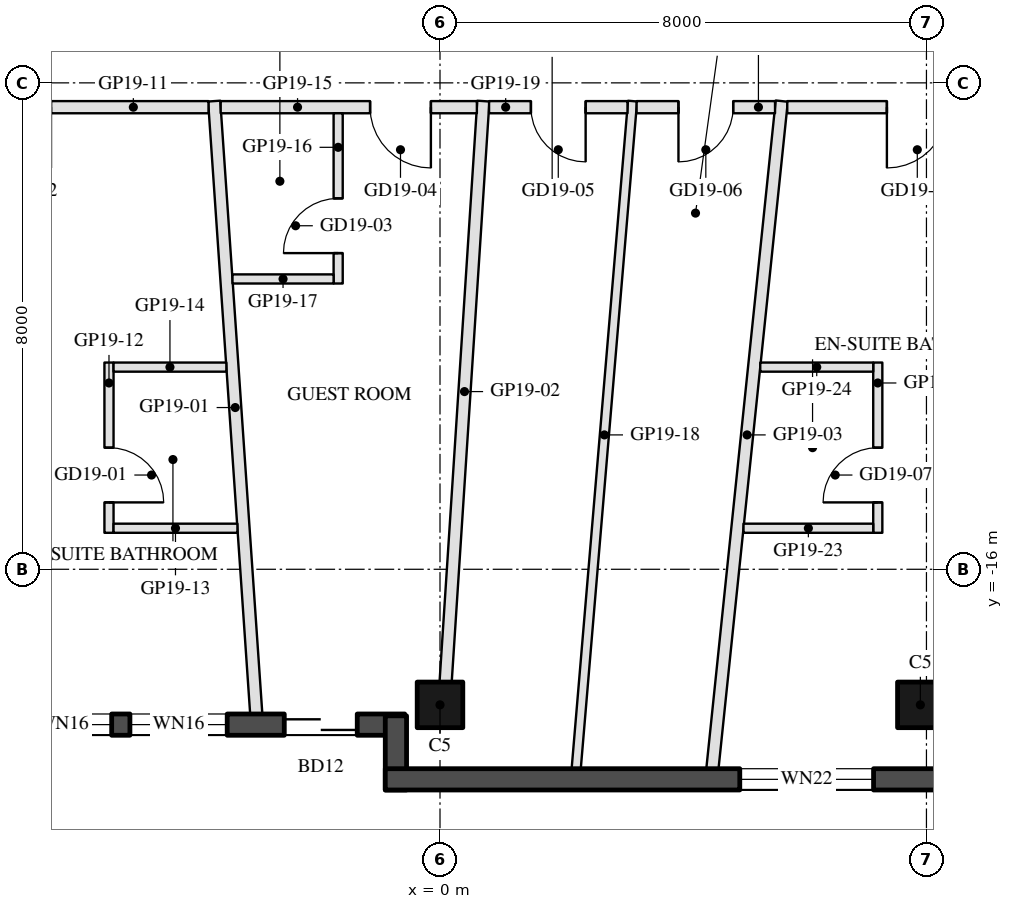
"""IFC4 building model, lengths in metres.
Left out: names, types, materials, properties, quantities, classifications, styles, units other than length and angle.
Written with IfcOpenShell. Run it as: python <this file> out.ifc"""

import sys

from ifc_helpers import new_model, si_unit, direction, frame, frame_2d, origin, origin_2d, place, context, subcontext, project, spatial, rectangle, hollow_rectangle, extrude, element, fill, save


model = new_model("IFC4")
c1 = context("Model", 3, precision=1e-05, world=origin(), true_north=direction((0.0, 1.0)))
c2 = subcontext(c1, "Body", "Model", "MODEL_VIEW")
j1 = project(units=[si_unit("LENGTHUNIT", "METRE"), si_unit("PLANEANGLEUNIT", "RADIAN")], contexts=[c1])
p1 = place(None, origin())
s1 = spatial("IfcSite", under=j1, at=p1, CompositionType="ELEMENT")
p2 = place(p1, origin())
s2 = spatial("IfcBuilding", under=s1, at=p2, CompositionType="ELEMENT")
p3 = place(p2, frame((0.0, 0.0, 205.8)))
s3 = spatial("IfcBuildingStorey", under=s2, at=p3, CompositionType="ELEMENT", Elevation=205.8)
for number, where, z_axis, x_axis in (
    (1, (0.0, -18.23, 0.0), (0.0, 0.0, 1.0), (-1.0, 0.0, 0.0)),
    (2, (7.9, -18.23, 0.0), (0.0, 0.0, 1.0), (-1.0, 0.0, 0.0)),
):
    element("IfcColumn", number, at=place(p3, frame(where, z_axis=z_axis, x_axis=x_axis)), inside=s3, PredefinedType="COLUMN", context=c2, shape_type="SweptSolid", body=[
        extrude(hollow_rectangle(XDim=0.75, YDim=0.75, WallThickness=0.035, at=origin_2d()), origin(), (0.0, 0.0, 1.0), 3.7),
    ])
p4 = place(p3, frame((-7.32, -18.555, 0.0), z_axis=(0.0, 0.0, 1.0), x_axis=(1.0, 0.0, 0.0)))
e3 = element("IfcWall", 3, at=p4, inside=s3, PredefinedType="SOLIDWALL", context=c2, shape_type="SweptSolid", body=[
    extrude(rectangle(XDim=6.74, YDim=0.35, at=frame_2d((3.37, 0.0))), origin(), (0.0, 0.0, 1.0), 3.55),
])
p5 = place(p4, frame((0.32, 0.0, 0.3)))
e4 = element("IfcOpeningElement", 4, at=p5, cuts=e3, PredefinedType="OPENING", context=c2, shape_type="SweptSolid", body=[
    extrude(rectangle(XDim=1.6, YDim=2.65, at=frame_2d((0.8, 1.325))), frame((0.0, 0.185, 0.0), z_axis=(0.0, -1.0, 0.0), x_axis=(1.0, 0.0, 0.0)), (0.0, 0.0, 1.0), 0.37),
])
p6 = place(p4, frame((2.22, 0.0, 0.3)))
e5 = element("IfcOpeningElement", 5, at=p6, cuts=e3, PredefinedType="OPENING", context=c2, shape_type="SweptSolid", body=[
    extrude(rectangle(XDim=1.6, YDim=2.65, at=frame_2d((0.8, 1.325))), frame((0.0, 0.185, 0.0), z_axis=(0.0, -1.0, 0.0), x_axis=(1.0, 0.0, 0.0)), (0.0, 0.0, 1.0), 0.37),
])
p7 = place(p4, frame((4.759, 0.0, 0.0)))
e6 = element("IfcOpeningElement", 6, at=p7, cuts=e3, PredefinedType="OPENING", context=c2, shape_type="SweptSolid", body=[
    extrude(rectangle(XDim=1.2, YDim=2.4, at=frame_2d((0.6, 1.2))), frame((0.0, 0.185, 0.0), z_axis=(0.0, -1.0, 0.0), x_axis=(1.0, 0.0, 0.0)), (0.0, 0.0, 1.0), 0.37),
])
p8 = place(p3, frame((-0.725, -18.41, 0.0), z_axis=(0.0, 0.0, 1.0), x_axis=(0.0, -1.0, 0.0)))
e7 = element("IfcWall", 7, at=p8, inside=s3, PredefinedType="SOLIDWALL", context=c2, shape_type="SweptSolid", body=[
    extrude(rectangle(XDim=1.22, YDim=0.35, at=frame_2d((0.61, 0.0))), origin(), (0.0, 0.0, 1.0), 3.55),
])
p9 = place(p3, frame((-0.9, -19.455, 0.0), z_axis=(0.0, 0.0, 1.0), x_axis=(1.0, 0.0, 0.0)))
e8 = element("IfcWall", 8, at=p9, inside=s3, PredefinedType="SOLIDWALL", context=c2, shape_type="SweptSolid", body=[
    extrude(rectangle(XDim=9.7, YDim=0.35, at=frame_2d((4.85, 0.0))), origin(), (0.0, 0.0, 1.0), 3.55),
])
p10 = place(p9, frame((5.83, 0.0, 0.3)))
e9 = element("IfcOpeningElement", 9, at=p10, cuts=e8, PredefinedType="OPENING", context=c2, shape_type="SweptSolid", body=[
    extrude(rectangle(XDim=2.2, YDim=2.65, at=frame_2d((1.1, 1.325))), frame((0.0, 0.185, 0.0), z_axis=(0.0, -1.0, 0.0), x_axis=(1.0, 0.0, 0.0)), (0.0, 0.0, 1.0), 0.37),
])
p11 = place(p3, frame((-3.022, -18.38, 0.0), z_axis=(0.0, 0.0, 1.0), x_axis=(-0.068480322914, 0.997652467232, 0.0)))
e10 = element("IfcWall", 10, at=p11, inside=s3, PredefinedType="PARTITIONING", context=c2, shape_type="SweptSolid", body=[
    extrude(rectangle(XDim=10.104, YDim=0.2, at=frame_2d((5.052, 0.0))), origin(), (0.0, 0.0, 1.0), 3.06),
])
p12 = place(p3, frame((0.093, -17.855, 0.0), z_axis=(0.0, 0.0, 1.0), x_axis=(0.064789362054, 0.997898962102, 0.0)))
e11 = element("IfcWall", 11, at=p12, inside=s3, PredefinedType="PARTITIONING", context=c2, shape_type="SweptSolid", body=[
    extrude(rectangle(XDim=9.575, YDim=0.2, at=frame_2d((4.788, 0.0))), origin(), (0.0, 0.0, 1.0), 2.95),
])
p13 = place(p3, frame((4.48, -19.28, 0.0), z_axis=(0.0, 0.0, 1.0), x_axis=(0.103348095524, 0.994645248896, 0.0)))
e12 = element("IfcWall", 12, at=p13, inside=s3, PredefinedType="PARTITIONING", context=c2, shape_type="SweptSolid", body=[
    extrude(rectangle(XDim=11.039, YDim=0.2, at=frame_2d((5.52, 0.0))), origin(), (0.0, 0.0, 1.0), 3.06),
])
p14 = place(p3, frame((-3.807, -8.4, 0.0), z_axis=(0.0, 0.0, 1.0), x_axis=(-1.0, 0.0, 0.0)))
e13 = element("IfcWall", 13, at=p14, inside=s3, PredefinedType="PARTITIONING", context=c2, shape_type="SweptSolid", body=[
    extrude(rectangle(XDim=6.181, YDim=0.2, at=frame_2d((3.091, 0.0))), origin(), (0.0, 0.0, 1.0), 2.95),
])
p15 = place(p14, frame((2.591, 0.0, 0.0)))
e14 = element("IfcOpeningElement", 14, at=p15, cuts=e13, PredefinedType="OPENING", context=c2, shape_type="SweptSolid", body=[
    extrude(rectangle(XDim=1.0, YDim=2.1, at=frame_2d((0.5, 1.05))), frame((0.0, 0.11, 0.0), z_axis=(0.0, -1.0, 0.0), x_axis=(1.0, 0.0, 0.0)), (0.0, 0.0, 1.0), 0.22),
])
p16 = place(p3, frame((-5.444, -12.6, 0.0), z_axis=(0.0, 0.0, 1.0), x_axis=(0.0, -1.0, 0.0)))
e15 = element("IfcWall", 15, at=p16, inside=s3, PredefinedType="PARTITIONING", context=c2, shape_type="SweptSolid", body=[
    extrude(rectangle(XDim=2.8, YDim=0.15, at=frame_2d((1.4, 0.0))), origin(), (0.0, 0.0, 1.0), 3.55),
])
p17 = place(p16, frame((1.4, 0.0, 0.0)))
e16 = element("IfcOpeningElement", 16, at=p17, cuts=e15, PredefinedType="OPENING", context=c2, shape_type="SweptSolid", body=[
    extrude(rectangle(XDim=0.9, YDim=2.1, at=frame_2d((0.45, 1.05))), frame((0.0, 0.085, 0.0), z_axis=(0.0, -1.0, 0.0), x_axis=(1.0, 0.0, 0.0)), (0.0, 0.0, 1.0), 0.17),
])
p18 = place(p3, frame((-5.369, -15.325, 0.0), z_axis=(0.0, 0.0, 1.0), x_axis=(1.0, 0.0, 0.0)))
e17 = element("IfcWall", 17, at=p18, inside=s3, PredefinedType="PARTITIONING", context=c2, shape_type="SweptSolid", body=[
    extrude(rectangle(XDim=2.037, YDim=0.15, at=frame_2d((1.019, 0.0))), origin(), (0.0, 0.0, 1.0), 2.95),
])
p19 = place(p3, frame((-5.369, -12.675, 0.0), z_axis=(0.0, 0.0, 1.0), x_axis=(1.0, 0.0, 0.0)))
e18 = element("IfcWall", 18, at=p19, inside=s3, PredefinedType="PARTITIONING", context=c2, shape_type="SweptSolid", body=[
    extrude(rectangle(XDim=1.855, YDim=0.15, at=frame_2d((0.928, 0.0))), origin(), (0.0, 0.0, 1.0), 2.95),
])
p20 = place(p3, frame((0.606, -8.4, 0.0), z_axis=(0.0, 0.0, 1.0), x_axis=(-1.0, 0.0, 0.0)))
e19 = element("IfcWall", 19, at=p20, inside=s3, PredefinedType="PARTITIONING", context=c2, shape_type="SweptSolid", body=[
    extrude(rectangle(XDim=4.213, YDim=0.2, at=frame_2d((2.106, 0.0))), origin(), (0.0, 0.0, 1.0), 2.95),
])
p21 = place(p20, frame((0.756, 0.0, 0.0)))
e20 = element("IfcOpeningElement", 20, at=p21, cuts=e19, PredefinedType="OPENING", context=c2, shape_type="SweptSolid", body=[
    extrude(rectangle(XDim=1.0, YDim=2.1, at=frame_2d((0.5, 1.05))), frame((0.0, 0.11, 0.0), z_axis=(0.0, -1.0, 0.0), x_axis=(1.0, 0.0, 0.0)), (0.0, 0.0, 1.0), 0.22),
])
p22 = place(p3, frame((-1.675, -11.3, 0.0), z_axis=(0.0, 0.0, 1.0), x_axis=(0.0, 1.0, 0.0)))
e21 = element("IfcWall", 21, at=p22, inside=s3, PredefinedType="PARTITIONING", context=c2, shape_type="SweptSolid", body=[
    extrude(rectangle(XDim=2.8, YDim=0.15, at=frame_2d((1.4, 0.0))), origin(), (0.0, 0.0, 1.0), 3.55),
])
p23 = place(p22, frame((0.5, 0.0, 0.0)))
e22 = element("IfcOpeningElement", 22, at=p23, cuts=e21, PredefinedType="OPENING", context=c2, shape_type="SweptSolid", body=[
    extrude(rectangle(XDim=0.9, YDim=2.1, at=frame_2d((0.45, 1.05))), frame((0.0, 0.085, 0.0), z_axis=(0.0, -1.0, 0.0), x_axis=(1.0, 0.0, 0.0)), (0.0, 0.0, 1.0), 0.17),
])
p24 = place(p3, frame((-3.413, -11.225, 0.0), z_axis=(0.0, 0.0, 1.0), x_axis=(1.0, 0.0, 0.0)))
e23 = element("IfcWall", 23, at=p24, inside=s3, PredefinedType="PARTITIONING", context=c2, shape_type="SweptSolid", body=[
    extrude(rectangle(XDim=1.663, YDim=0.15, at=frame_2d((0.832, 0.0))), origin(), (0.0, 0.0, 1.0), 3.55),
])
p25 = place(p3, frame((2.24, -19.28, 0.0), z_axis=(0.0, 0.0, 1.0), x_axis=(0.084127266942, 0.99645501803, 0.0)))
e24 = element("IfcWall", 24, at=p25, inside=s3, PredefinedType="PARTITIONING", context=c2, shape_type="SweptSolid", body=[
    extrude(rectangle(XDim=11.019, YDim=0.15, at=frame_2d((5.51, 0.0))), origin(), (0.0, 0.0, 1.0), 3.06),
])
p26 = place(p3, frame((3.083, -8.4, 0.0), z_axis=(0.0, 0.0, 1.0), x_axis=(-1.0, 0.0, 0.0)))
e25 = element("IfcWall", 25, at=p26, inside=s3, PredefinedType="PARTITIONING", context=c2, shape_type="SweptSolid", body=[
    extrude(rectangle(XDim=2.277, YDim=0.2, at=frame_2d((1.138, 0.0))), origin(), (0.0, 0.0, 1.0), 3.55),
])
p27 = place(p26, frame((0.688, 0.0, 0.0)))
e26 = element("IfcOpeningElement", 26, at=p27, cuts=e25, PredefinedType="OPENING", context=c2, shape_type="SweptSolid", body=[
    extrude(rectangle(XDim=0.9, YDim=2.1, at=frame_2d((0.45, 1.05))), frame((0.0, 0.11, 0.0), z_axis=(0.0, -1.0, 0.0), x_axis=(1.0, 0.0, 0.0)), (0.0, 0.0, 1.0), 0.22),
])
p28 = place(p3, frame((5.51, -8.4, 0.0), z_axis=(0.0, 0.0, 1.0), x_axis=(-1.0, 0.0, 0.0)))
e27 = element("IfcWall", 27, at=p28, inside=s3, PredefinedType="PARTITIONING", context=c2, shape_type="SweptSolid", body=[
    extrude(rectangle(XDim=2.277, YDim=0.2, at=frame_2d((1.138, 0.0))), origin(), (0.0, 0.0, 1.0), 2.95),
])
p29 = place(p28, frame((0.688, 0.0, 0.0)))
e28 = element("IfcOpeningElement", 28, at=p29, cuts=e27, PredefinedType="OPENING", context=c2, shape_type="SweptSolid", body=[
    extrude(rectangle(XDim=0.9, YDim=2.1, at=frame_2d((0.45, 1.05))), frame((0.0, 0.11, 0.0), z_axis=(0.0, -1.0, 0.0), x_axis=(1.0, 0.0, 0.0)), (0.0, 0.0, 1.0), 0.22),
])
p30 = place(p3, frame((9.988, -8.4, 0.0), z_axis=(0.0, 0.0, 1.0), x_axis=(-1.0, 0.0, 0.0)))
e29 = element("IfcWall", 29, at=p30, inside=s3, PredefinedType="PARTITIONING", context=c2, shape_type="SweptSolid", body=[
    extrude(rectangle(XDim=4.277, YDim=0.2, at=frame_2d((2.139, 0.0))), origin(), (0.0, 0.0, 1.0), 2.95),
])
p31 = place(p30, frame((1.639, 0.0, 0.0)))
e30 = element("IfcOpeningElement", 30, at=p31, cuts=e29, PredefinedType="OPENING", context=c2, shape_type="SweptSolid", body=[
    extrude(rectangle(XDim=1.0, YDim=2.1, at=frame_2d((0.5, 1.05))), frame((0.0, 0.11, 0.0), z_axis=(0.0, -1.0, 0.0), x_axis=(1.0, 0.0, 0.0)), (0.0, 0.0, 1.0), 0.22),
])
p32 = place(p3, frame((7.2, -15.4, 0.0), z_axis=(0.0, 0.0, 1.0), x_axis=(0.0, 1.0, 0.0)))
e31 = element("IfcWall", 31, at=p32, inside=s3, PredefinedType="PARTITIONING", context=c2, shape_type="SweptSolid", body=[
    extrude(rectangle(XDim=2.8, YDim=0.15, at=frame_2d((1.4, 0.0))), origin(), (0.0, 0.0, 1.0), 3.55),
])
p33 = place(p32, frame((0.5, 0.0, 0.0)))
e32 = element("IfcOpeningElement", 32, at=p33, cuts=e31, PredefinedType="OPENING", context=c2, shape_type="SweptSolid", body=[
    extrude(rectangle(XDim=0.9, YDim=2.1, at=frame_2d((0.45, 1.05))), frame((0.0, 0.085, 0.0), z_axis=(0.0, -1.0, 0.0), x_axis=(1.0, 0.0, 0.0)), (0.0, 0.0, 1.0), 0.17),
])
p34 = place(p3, frame((4.991, -15.325, 0.0), z_axis=(0.0, 0.0, 1.0), x_axis=(1.0, 0.0, 0.0)))
e33 = element("IfcWall", 33, at=p34, inside=s3, PredefinedType="PARTITIONING", context=c2, shape_type="SweptSolid", body=[
    extrude(rectangle(XDim=2.133, YDim=0.15, at=frame_2d((1.066, 0.0))), origin(), (0.0, 0.0, 1.0), 3.55),
])
p35 = place(p3, frame((5.267, -12.675, 0.0), z_axis=(0.0, 0.0, 1.0), x_axis=(1.0, 0.0, 0.0)))
e34 = element("IfcWall", 34, at=p35, inside=s3, PredefinedType="PARTITIONING", context=c2, shape_type="SweptSolid", body=[
    extrude(rectangle(XDim=1.858, YDim=0.15, at=frame_2d((0.929, 0.0))), origin(), (0.0, 0.0, 1.0), 3.55),
])
p36 = place(p5, origin())
e35 = element("IfcWindow", 35, at=p36, inside=s3, PartitioningType="SINGLE_PANEL", PredefinedType="WINDOW", context=c2, shape_type="SweptSolid", body=[
    extrude(rectangle(XDim=1.6, YDim=2.65, at=frame_2d((0.8, 1.325))), frame((0.0, 0.03, 0.0), z_axis=(0.0, -1.0, 0.0), x_axis=(1.0, 0.0, 0.0)), (0.0, 0.0, 1.0), 0.06),
])
fill(e4, e35)
p37 = place(p6, origin())
e36 = element("IfcWindow", 36, at=p37, inside=s3, PartitioningType="SINGLE_PANEL", PredefinedType="WINDOW", context=c2, shape_type="SweptSolid", body=[
    extrude(rectangle(XDim=1.6, YDim=2.65, at=frame_2d((0.8, 1.325))), frame((0.0, 0.03, 0.0), z_axis=(0.0, -1.0, 0.0), x_axis=(1.0, 0.0, 0.0)), (0.0, 0.0, 1.0), 0.06),
])
fill(e5, e36)
p38 = place(p7, frame((1.2, 0.0, 0.0), z_axis=(0.0, 0.0, 1.0), x_axis=(-1.0, 0.0, 0.0)))
e37 = element("IfcDoor", 37, at=p38, inside=s3, OperationType="SLIDING_TO_LEFT", PredefinedType="DOOR", context=c2, shape_type="SweptSolid", body=[
    extrude(rectangle(XDim=1.2, YDim=2.4, at=frame_2d((0.6, 1.2))), frame((0.0, 0.025, 0.0), z_axis=(0.0, -1.0, 0.0), x_axis=(1.0, 0.0, 0.0)), (0.0, 0.0, 1.0), 0.05),
])
fill(e6, e37)
p39 = place(p10, origin())
e38 = element("IfcWindow", 38, at=p39, inside=s3, PartitioningType="SINGLE_PANEL", PredefinedType="WINDOW", context=c2, shape_type="SweptSolid", body=[
    extrude(rectangle(XDim=2.2, YDim=2.65, at=frame_2d((1.1, 1.325))), frame((0.0, 0.03, 0.0), z_axis=(0.0, -1.0, 0.0), x_axis=(1.0, 0.0, 0.0)), (0.0, 0.0, 1.0), 0.06),
])
fill(e9, e38)
p40 = place(p17, origin())
e39 = element("IfcDoor", 39, at=p40, inside=s3, OperationType="SINGLE_SWING_RIGHT", PredefinedType="DOOR", context=c2, shape_type="SweptSolid", body=[
    extrude(rectangle(XDim=0.9, YDim=2.1, at=frame_2d((0.45, 1.05))), frame((0.0, 0.025, 0.0), z_axis=(0.0, -1.0, 0.0), x_axis=(1.0, 0.0, 0.0)), (0.0, 0.0, 1.0), 0.05),
])
fill(e16, e39)
p41 = place(p23, origin())
e40 = element("IfcDoor", 40, at=p41, inside=s3, OperationType="SINGLE_SWING_LEFT", PredefinedType="DOOR", context=c2, shape_type="SweptSolid", body=[
    extrude(rectangle(XDim=0.9, YDim=2.1, at=frame_2d((0.45, 1.05))), frame((0.0, 0.025, 0.0), z_axis=(0.0, -1.0, 0.0), x_axis=(1.0, 0.0, 0.0)), (0.0, 0.0, 1.0), 0.05),
])
fill(e22, e40)
p42 = place(p21, origin())
e41 = element("IfcDoor", 41, at=p42, inside=s3, OperationType="SINGLE_SWING_LEFT", PredefinedType="DOOR", context=c2, shape_type="SweptSolid", body=[
    extrude(rectangle(XDim=1.0, YDim=2.1, at=frame_2d((0.5, 1.05))), frame((0.0, 0.025, 0.0), z_axis=(0.0, -1.0, 0.0), x_axis=(1.0, 0.0, 0.0)), (0.0, 0.0, 1.0), 0.05),
])
fill(e20, e41)
p43 = place(p27, origin())
e42 = element("IfcDoor", 42, at=p43, inside=s3, OperationType="SINGLE_SWING_LEFT", PredefinedType="DOOR", context=c2, shape_type="SweptSolid", body=[
    extrude(rectangle(XDim=0.9, YDim=2.1, at=frame_2d((0.45, 1.05))), frame((0.0, 0.025, 0.0), z_axis=(0.0, -1.0, 0.0), x_axis=(1.0, 0.0, 0.0)), (0.0, 0.0, 1.0), 0.05),
])
fill(e26, e42)
p44 = place(p29, origin())
e43 = element("IfcDoor", 43, at=p44, inside=s3, OperationType="SINGLE_SWING_RIGHT", PredefinedType="DOOR", context=c2, shape_type="SweptSolid", body=[
    extrude(rectangle(XDim=0.9, YDim=2.1, at=frame_2d((0.45, 1.05))), frame((0.0, 0.025, 0.0), z_axis=(0.0, -1.0, 0.0), x_axis=(1.0, 0.0, 0.0)), (0.0, 0.0, 1.0), 0.05),
])
fill(e28, e43)
p45 = place(p33, origin())
e44 = element("IfcDoor", 44, at=p45, inside=s3, OperationType="SINGLE_SWING_LEFT", PredefinedType="DOOR", context=c2, shape_type="SweptSolid", body=[
    extrude(rectangle(XDim=0.9, YDim=2.1, at=frame_2d((0.45, 1.05))), frame((0.0, 0.025, 0.0), z_axis=(0.0, -1.0, 0.0), x_axis=(1.0, 0.0, 0.0)), (0.0, 0.0, 1.0), 0.05),
])
fill(e32, e44)
p46 = place(p31, origin())
e45 = element("IfcDoor", 45, at=p46, inside=s3, OperationType="SINGLE_SWING_RIGHT", PredefinedType="DOOR", context=c2, shape_type="SweptSolid", body=[
    extrude(rectangle(XDim=1.0, YDim=2.1, at=frame_2d((0.5, 1.05))), frame((0.0, 0.025, 0.0), z_axis=(0.0, -1.0, 0.0), x_axis=(1.0, 0.0, 0.0)), (0.0, 0.0, 1.0), 0.05),
])
fill(e30, e45)
save(model, sys.argv[1])
